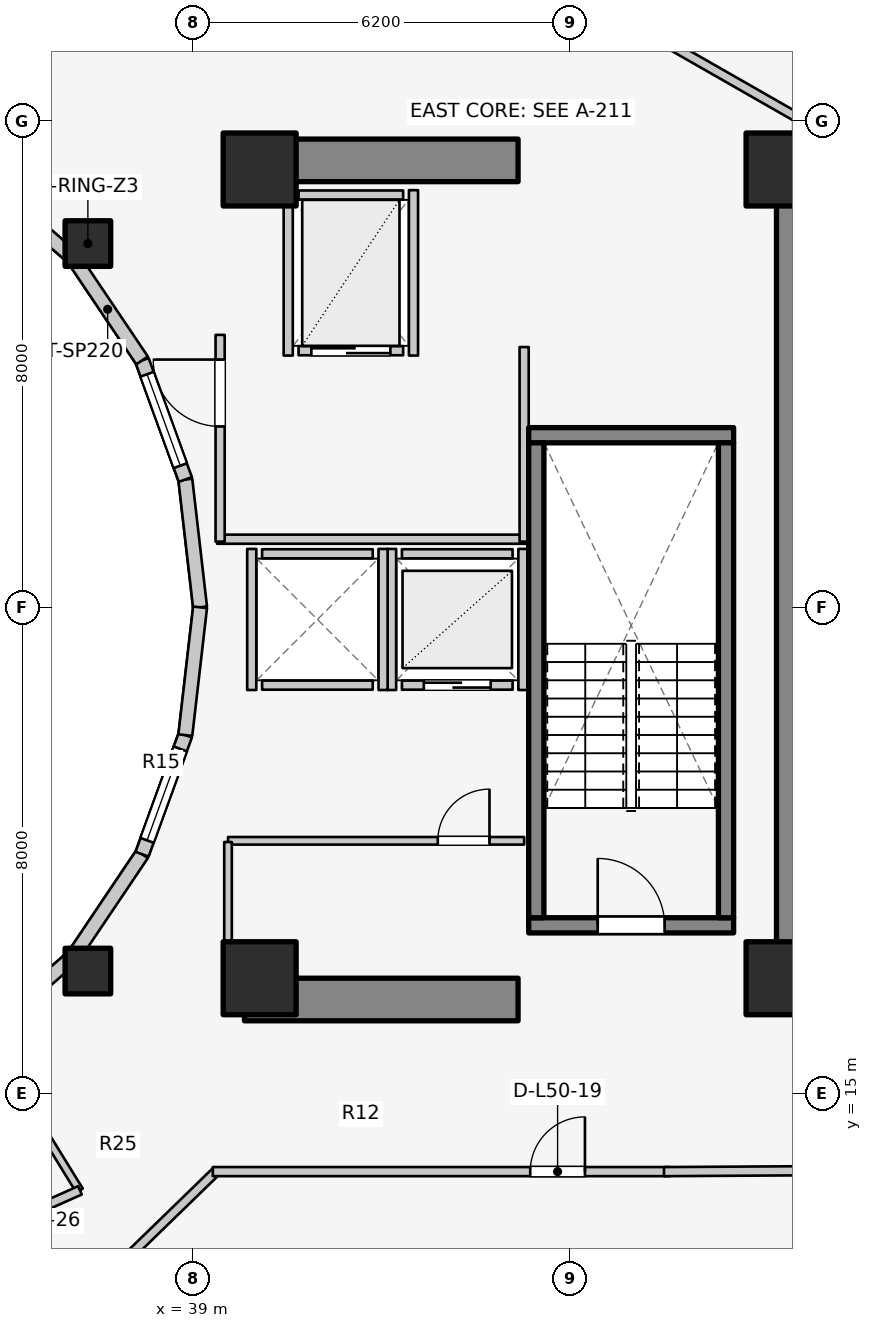
"""IFC4 building model, lengths in metres.
Left out: names, types, materials, properties, quantities, classifications, styles, units other than length and angle.
Written with IfcOpenShell. Run it as: python <this file> out.ifc"""

import sys

from ifc_helpers import new_model, si_unit, direction, frame, frame_2d, origin, origin_2d, place, context, subcontext, project, spatial, rectangle, extrude, element, fill, save


model = new_model("IFC4")
c1 = context("Model", 3, precision=1e-05, world=origin(), true_north=direction((0.0, 1.0)))
c2 = subcontext(c1, "Body", "Model", "MODEL_VIEW")
j1 = project(units=[si_unit("LENGTHUNIT", "METRE"), si_unit("PLANEANGLEUNIT", "RADIAN")], contexts=[c1])
p1 = place(None, origin())
s1 = spatial("IfcSite", under=j1, at=p1, CompositionType="ELEMENT")
p2 = place(p1, origin())
s2 = spatial("IfcBuilding", under=s1, at=p2, CompositionType="ELEMENT")
p3 = place(p2, frame((0.0, 0.0, 165.3)))
s3 = spatial("IfcBuildingStorey", under=s2, at=p3, CompositionType="ELEMENT", Elevation=165.3)
p4 = place(p3, frame((48.95, 17.05, 0.0), z_axis=(0.0, 0.0, 1.0), x_axis=(0.0, 1.0, 0.0)))
e1 = element("IfcWall", 1, at=p4, inside=s3, PredefinedType="SHEAR", context=c2, shape_type="SweptSolid", body=[
    extrude(rectangle(XDim=12.8, YDim=0.7, at=frame_2d((6.4, 0.0))), origin(), (0.0, 0.0, 1.0), 3.1),
])
for number, where, z_axis, x_axis in (
    (2, (39.85, 16.55, 0.0), (0.0, 0.0, 1.0), (1.0, 0.0, 0.0)),
    (3, (39.85, 30.35, 0.0), (0.0, 0.0, 1.0), (1.0, 0.0, 0.0)),
):
    element("IfcWall", number, at=place(p3, frame(where, z_axis=z_axis, x_axis=x_axis)), inside=s3, PredefinedType="SHEAR", context=c2, shape_type="SweptSolid", body=[
        extrude(rectangle(XDim=4.5, YDim=0.7, at=frame_2d((2.25, 0.0))), origin(), (0.0, 0.0, 1.0), 3.1),
    ])
p5 = place(p3, frame((44.525, 17.77, 0.0), z_axis=(0.0, 0.0, 1.0), x_axis=(1.0, 0.0, 0.0)))
e4 = element("IfcWall", 4, at=p5, inside=s3, PredefinedType="SOLIDWALL", context=c2, shape_type="SweptSolid", body=[
    extrude(rectangle(XDim=3.37, YDim=0.25, at=frame_2d((1.685, 0.0))), origin(), (0.0, 0.0, 1.0), 3.1),
])
p6 = place(p5, frame((1.135, 0.0, 0.0)))
e5 = element("IfcOpeningElement", 5, at=p6, cuts=e4, PredefinedType="OPENING", context=c2, shape_type="SweptSolid", body=[
    extrude(rectangle(XDim=1.1, YDim=2.1, at=frame_2d((0.55, 1.05))), frame((0.0, 0.135, 0.0), z_axis=(0.0, -1.0, 0.0), x_axis=(1.0, 0.0, 0.0)), (0.0, 0.0, 1.0), 0.27),
])
p7 = place(p3, frame((44.525, 25.83, 0.0), z_axis=(0.0, 0.0, 1.0), x_axis=(1.0, 0.0, 0.0)))
e6 = element("IfcWall", 6, at=p7, inside=s3, PredefinedType="SOLIDWALL", context=c2, shape_type="SweptSolid", body=[
    extrude(rectangle(XDim=3.37, YDim=0.25, at=frame_2d((1.685, 0.0))), origin(), (0.0, 0.0, 1.0), 3.1),
])
for number, where, z_axis, x_axis in (
    (7, (44.65, 17.895, 0.0), (0.0, 0.0, 1.0), (0.0, 1.0, 0.0)),
    (8, (47.77, 17.895, 0.0), (0.0, 0.0, 1.0), (0.0, 1.0, 0.0)),
):
    element("IfcWall", number, at=place(p3, frame(where, z_axis=z_axis, x_axis=x_axis)), inside=s3, PredefinedType="SOLIDWALL", context=c2, shape_type="SweptSolid", body=[
        extrude(rectangle(XDim=7.81, YDim=0.25, at=frame_2d((3.905, 0.0))), origin(), (0.0, 0.0, 1.0), 3.1),
    ])
for number, where, z_axis, x_axis in (
    (9, (40.1, 16.9, 0.0), (0.0, 0.0, 1.0), (1.0, 0.0, 0.0)),
    (10, (48.7, 16.9, 0.0), (0.0, 0.0, 1.0), (1.0, 0.0, 0.0)),
    (11, (48.7, 30.2, 0.0), (0.0, 0.0, 1.0), (1.0, 0.0, 0.0)),
    (12, (40.1, 30.2, 0.0), (0.0, 0.0, 1.0), (1.0, 0.0, 0.0)),
):
    element("IfcColumn", number, at=place(p3, frame(where, z_axis=z_axis, x_axis=x_axis)), inside=s3, PredefinedType="COLUMN", context=c2, shape_type="SweptSolid", body=[
        extrude(rectangle(XDim=1.2, YDim=1.2, at=origin_2d()), origin(), (0.0, 0.0, 1.0), 3.1),
    ])
for number, where, z_axis, x_axis in (
    (13, (37.275, 28.982, 0.0), (0.0, 0.0, 1.0), (1.0, 0.0, 0.0)),
    (14, (37.275, 17.018, 0.0), (0.0, 0.0, 1.0), (1.0, 0.0, 0.0)),
):
    element("IfcColumn", number, at=place(p3, frame(where, z_axis=z_axis, x_axis=x_axis)), inside=s3, PredefinedType="COLUMN", context=c2, shape_type="SweptSolid", body=[
        extrude(rectangle(XDim=0.75, YDim=0.75, at=origin_2d()), origin(), (0.0, 0.0, 1.0), 3.1),
    ])
p8 = place(p3, frame((39.12, 23.0, 0.0), z_axis=(0.0, 0.0, 1.0), x_axis=(-0.114711713601, 0.993398823617, 0.0)))
e15 = element("IfcWall", 15, at=p8, inside=s3, PredefinedType="STANDARD", context=c2, shape_type="SweptSolid", body=[
    extrude(rectangle(XDim=2.115, YDim=0.23, at=frame_2d((1.058, 0.0))), origin(), (0.0, 0.0, 1.0), 2.84),
])
p9 = place(p3, frame((38.877, 25.102, 0.0), z_axis=(0.0, 0.0, 1.0), x_axis=(-0.341423187295, 0.93990968033, 0.0)))
e16 = element("IfcWall", 16, at=p9, inside=s3, PredefinedType="STANDARD", context=c2, shape_type="SweptSolid", body=[
    extrude(rectangle(XDim=2.084, YDim=0.23, at=frame_2d((1.042, 0.0))), origin(), (0.0, 0.0, 1.0), 2.84),
])
p10 = place(p9, frame((0.242, 0.0, 0.85)))
e17 = element("IfcOpeningElement", 17, at=p10, cuts=e16, PredefinedType="OPENING", context=c2, shape_type="SweptSolid", body=[
    extrude(rectangle(XDim=1.6, YDim=1.65, at=frame_2d((0.8, 0.825))), frame((0.0, 0.125, 0.0), z_axis=(0.0, -1.0, 0.0), x_axis=(1.0, 0.0, 0.0)), (0.0, 0.0, 1.0), 0.25),
])
p11 = place(p3, frame((38.166, 27.06, 0.0), z_axis=(0.0, 0.0, 1.0), x_axis=(-0.558197800898, 0.829707909492, 0.0)))
e18 = element("IfcWall", 18, at=p11, inside=s3, PredefinedType="STANDARD", context=c2, shape_type="SweptSolid", body=[
    extrude(rectangle(XDim=2.027, YDim=0.23, at=frame_2d((1.013, 0.0))), origin(), (0.0, 0.0, 1.0), 2.16),
])
for number, where, z_axis, x_axis in (
    (19, (37.035, 28.742, 0.0), (0.0, 0.0, 1.0), (-0.753, 0.659, 0.0)),
    (20, (35.56, 15.968, 0.0), (0.0, 0.0, 1.0), (0.753, 0.659, 0.0)),
):
    element("IfcWall", number, at=place(p3, frame(where, z_axis=z_axis, x_axis=x_axis)), inside=s3, PredefinedType="STANDARD", context=c2, shape_type="SweptSolid", body=[
        extrude(rectangle(XDim=1.959, YDim=0.23, at=frame_2d((0.98, 0.0))), origin(), (0.0, 0.0, 1.0), 2.16),
    ])
p12 = place(p3, frame((37.035, 17.258, 0.0), z_axis=(0.0, 0.0, 1.0), x_axis=(0.558197800898, 0.829707909492, 0.0)))
e21 = element("IfcWall", 21, at=p12, inside=s3, PredefinedType="STANDARD", context=c2, shape_type="SweptSolid", body=[
    extrude(rectangle(XDim=2.027, YDim=0.23, at=frame_2d((1.013, 0.0))), origin(), (0.0, 0.0, 1.0), 2.16),
])
p13 = place(p3, frame((38.166, 18.94, 0.0), z_axis=(0.0, 0.0, 1.0), x_axis=(0.341423187295, 0.93990968033, 0.0)))
e22 = element("IfcWall", 22, at=p13, inside=s3, PredefinedType="STANDARD", context=c2, shape_type="SweptSolid", body=[
    extrude(rectangle(XDim=2.084, YDim=0.23, at=frame_2d((1.042, 0.0))), origin(), (0.0, 0.0, 1.0), 2.84),
])
p14 = place(p13, frame((0.242, 0.0, 0.85)))
e23 = element("IfcOpeningElement", 23, at=p14, cuts=e22, PredefinedType="OPENING", context=c2, shape_type="SweptSolid", body=[
    extrude(rectangle(XDim=1.6, YDim=1.65, at=frame_2d((0.8, 0.825))), frame((0.0, 0.125, 0.0), z_axis=(0.0, -1.0, 0.0), x_axis=(1.0, 0.0, 0.0)), (0.0, 0.0, 1.0), 0.25),
])
p15 = place(p3, frame((38.877, 20.898, 0.0), z_axis=(0.0, 0.0, 1.0), x_axis=(0.114711713601, 0.993398823617, 0.0)))
e24 = element("IfcWall", 24, at=p15, inside=s3, PredefinedType="STANDARD", context=c2, shape_type="SweptSolid", body=[
    extrude(rectangle(XDim=2.115, YDim=0.23, at=frame_2d((1.058, 0.0))), origin(), (0.0, 0.0, 1.0), 2.84),
])
p16 = place(p3, frame((48.269, 11.158, 0.0), z_axis=(0.0, 0.0, 1.0), x_axis=(0.790185650662, 0.612867552973, 0.0)))
e25 = element("IfcWall", 25, at=p16, inside=s3, PredefinedType="STANDARD", context=c2, shape_type="SweptSolid", body=[
    extrude(rectangle(XDim=4.239, YDim=0.26, at=frame_2d((2.12, 0.0))), origin(), (0.0, 0.0, 1.0), 2.85),
])
p17 = place(p16, frame((1.37, 0.0, 0.75)))
e26 = element("IfcOpeningElement", 26, at=p17, cuts=e25, PredefinedType="OPENING", context=c2, shape_type="SweptSolid", body=[
    extrude(rectangle(XDim=1.5, YDim=1.6, at=frame_2d((0.75, 0.8))), frame((0.0, 0.14, 0.0), z_axis=(0.0, -1.0, 0.0), x_axis=(1.0, 0.0, 0.0)), (0.0, 0.0, 1.0), 0.28),
])
p18 = place(p3, frame((42.44, 21.72, 0.0), z_axis=(0.0, 0.0, 1.0), x_axis=(1.0, 0.0, 0.0)))
e27 = element("IfcWall", 27, at=p18, inside=s3, PredefinedType="SOLIDWALL", context=c2, shape_type="SweptSolid", body=[
    extrude(rectangle(XDim=1.82, YDim=0.15, at=frame_2d((0.91, 0.0))), origin(), (0.0, 0.0, 1.0), 2.855),
])
p19 = place(p18, frame((0.36, 0.0, 0.0)))
e28 = element("IfcOpeningElement", 28, at=p19, cuts=e27, PredefinedType="OPENING", context=c2, shape_type="SweptSolid", body=[
    extrude(rectangle(XDim=1.1, YDim=2.1, at=frame_2d((0.55, 1.05))), frame((0.0, 0.085, 0.0), z_axis=(0.0, -1.0, 0.0), x_axis=(1.0, 0.0, 0.0)), (0.0, 0.0, 1.0), 0.17),
])
p20 = place(p3, frame((42.44, 23.88, 0.0), z_axis=(0.0, 0.0, 1.0), x_axis=(1.0, 0.0, 0.0)))
e29 = element("IfcWall", 29, at=p20, inside=s3, PredefinedType="SOLIDWALL", context=c2, shape_type="SweptSolid", body=[
    extrude(rectangle(XDim=1.82, YDim=0.15, at=frame_2d((0.91, 0.0))), origin(), (0.0, 0.0, 1.0), 2.855),
])
for number, where, z_axis, x_axis in (
    (30, (42.27, 21.64, 0.0), (0.0, 0.0, 1.0), (0.0, 1.0, 0.0)),
    (31, (44.43, 21.64, 0.0), (0.0, 0.0, 1.0), (0.0, 1.0, 0.0)),
):
    element("IfcWall", number, at=place(p3, frame(where, z_axis=z_axis, x_axis=x_axis)), inside=s3, PredefinedType="SOLIDWALL", context=c2, shape_type="SweptSolid", body=[
        extrude(rectangle(XDim=2.32, YDim=0.15, at=frame_2d((1.16, 0.0))), origin(), (0.0, 0.0, 1.0), 2.855),
    ])
for number, where, z_axis, x_axis in (
    (32, (40.14, 21.72, 0.0), (0.0, 0.0, 1.0), (1.0, 0.0, 0.0)),
    (33, (40.14, 23.88, 0.0), (0.0, 0.0, 1.0), (1.0, 0.0, 0.0)),
):
    element("IfcWall", number, at=place(p3, frame(where, z_axis=z_axis, x_axis=x_axis)), inside=s3, PredefinedType="SOLIDWALL", context=c2, shape_type="SweptSolid", body=[
        extrude(rectangle(XDim=1.82, YDim=0.15, at=frame_2d((0.91, 0.0))), origin(), (0.0, 0.0, 1.0), 2.12),
    ])
p21 = place(p3, frame((39.97, 21.64, 0.0), z_axis=(0.0, 0.0, 1.0), x_axis=(0.0, 1.0, 0.0)))
e34 = element("IfcWall", 34, at=p21, inside=s3, PredefinedType="SOLIDWALL", context=c2, shape_type="SweptSolid", body=[
    extrude(rectangle(XDim=2.32, YDim=0.15, at=frame_2d((1.16, 0.0))), origin(), (0.0, 0.0, 1.0), 2.12),
])
p22 = place(p3, frame((42.13, 21.64, 0.0), z_axis=(0.0, 0.0, 1.0), x_axis=(0.0, 1.0, 0.0)))
e35 = element("IfcWall", 35, at=p22, inside=s3, PredefinedType="SOLIDWALL", context=c2, shape_type="SweptSolid", body=[
    extrude(rectangle(XDim=2.32, YDim=0.15, at=frame_2d((1.16, 0.0))), origin(), (0.0, 0.0, 1.0), 2.855),
])
p23 = place(p3, frame((40.74, 27.22, 0.0), z_axis=(0.0, 0.0, 1.0), x_axis=(1.0, 0.0, 0.0)))
e36 = element("IfcWall", 36, at=p23, inside=s3, PredefinedType="SOLIDWALL", context=c2, shape_type="SweptSolid", body=[
    extrude(rectangle(XDim=1.72, YDim=0.15, at=frame_2d((0.86, 0.0))), origin(), (0.0, 0.0, 1.0), 2.855),
])
p24 = place(p23, frame((0.21, 0.0, 0.0)))
e37 = element("IfcOpeningElement", 37, at=p24, cuts=e36, PredefinedType="OPENING", context=c2, shape_type="SweptSolid", body=[
    extrude(rectangle(XDim=1.3, YDim=2.1, at=frame_2d((0.65, 1.05))), frame((0.0, 0.085, 0.0), z_axis=(0.0, -1.0, 0.0), x_axis=(1.0, 0.0, 0.0)), (0.0, 0.0, 1.0), 0.17),
])
p25 = place(p3, frame((40.74, 29.78, 0.0), z_axis=(0.0, 0.0, 1.0), x_axis=(1.0, 0.0, 0.0)))
e38 = element("IfcWall", 38, at=p25, inside=s3, PredefinedType="SOLIDWALL", context=c2, shape_type="SweptSolid", body=[
    extrude(rectangle(XDim=1.72, YDim=0.15, at=frame_2d((0.86, 0.0))), origin(), (0.0, 0.0, 1.0), 2.855),
])
for number, where, z_axis, x_axis in (
    (39, (40.57, 27.14, 0.0), (0.0, 0.0, 1.0), (0.0, 1.0, 0.0)),
    (40, (42.63, 27.14, 0.0), (0.0, 0.0, 1.0), (0.0, 1.0, 0.0)),
):
    element("IfcWall", number, at=place(p3, frame(where, z_axis=z_axis, x_axis=x_axis)), inside=s3, PredefinedType="SOLIDWALL", context=c2, shape_type="SweptSolid", body=[
        extrude(rectangle(XDim=2.72, YDim=0.15, at=frame_2d((1.36, 0.0))), origin(), (0.0, 0.0, 1.0), 2.855),
    ])
p26 = place(p3, frame((39.4, 24.12, 0.0), z_axis=(0.0, 0.0, 1.0), x_axis=(1.0, 0.0, 0.0)))
e41 = element("IfcWall", 41, at=p26, inside=s3, PredefinedType="PARTITIONING", context=c2, shape_type="SweptSolid", body=[
    extrude(rectangle(XDim=5.08, YDim=0.15, at=frame_2d((2.54, 0.0))), origin(), (0.0, 0.0, 1.0), 2.12),
])
p27 = place(p3, frame((44.45, 24.08, 0.0), z_axis=(0.0, 0.0, 1.0), x_axis=(0.0, 1.0, 0.0)))
e42 = element("IfcWall", 42, at=p27, inside=s3, PredefinedType="PARTITIONING", context=c2, shape_type="SweptSolid", body=[
    extrude(rectangle(XDim=3.2, YDim=0.15, at=frame_2d((1.6, 0.0))), origin(), (0.0, 0.0, 1.0), 2.855),
])
p28 = place(p3, frame((39.45, 24.08, 0.0), z_axis=(0.0, 0.0, 1.0), x_axis=(0.0, 1.0, 0.0)))
e43 = element("IfcWall", 43, at=p28, inside=s3, PredefinedType="PARTITIONING", context=c2, shape_type="SweptSolid", body=[
    extrude(rectangle(XDim=3.4, YDim=0.15, at=frame_2d((1.7, 0.0))), origin(), (0.0, 0.0, 1.0), 2.855),
])
p29 = place(p28, frame((1.894, 0.0, 0.0)))
e44 = element("IfcOpeningElement", 44, at=p29, cuts=e43, PredefinedType="OPENING", context=c2, shape_type="SweptSolid", body=[
    extrude(rectangle(XDim=1.1, YDim=2.1, at=frame_2d((0.55, 1.05))), frame((0.0, 0.085, 0.0), z_axis=(0.0, -1.0, 0.0), x_axis=(1.0, 0.0, 0.0)), (0.0, 0.0, 1.0), 0.17),
])
p30 = place(p3, frame((39.58, 19.16, 0.0), z_axis=(0.0, 0.0, 1.0), x_axis=(1.0, 0.0, 0.0)))
e45 = element("IfcWall", 45, at=p30, inside=s3, PredefinedType="PARTITIONING", context=c2, shape_type="SweptSolid", body=[
    extrude(rectangle(XDim=4.87, YDim=0.125, at=frame_2d((2.435, 0.0))), origin(), (0.0, 0.0, 1.0), 2.12),
])
p31 = place(p30, frame((3.45, 0.0, 0.0)))
e46 = element("IfcOpeningElement", 46, at=p31, cuts=e45, PredefinedType="OPENING", context=c2, shape_type="SweptSolid", body=[
    extrude(rectangle(XDim=0.85, YDim=2.05, at=frame_2d((0.425, 1.025))), frame((0.0, 0.073, 0.0), z_axis=(0.0, -1.0, 0.0), x_axis=(1.0, 0.0, 0.0)), (0.0, 0.0, 1.0), 0.145),
])
p32 = place(p3, frame((39.58, 17.1, 0.0), z_axis=(0.0, 0.0, 1.0), x_axis=(0.0, 1.0, 0.0)))
e47 = element("IfcWall", 47, at=p32, inside=s3, PredefinedType="PARTITIONING", context=c2, shape_type="SweptSolid", body=[
    extrude(rectangle(XDim=2.04, YDim=0.125, at=frame_2d((1.02, 0.0))), origin(), (0.0, 0.0, 1.0), 2.232),
])
p33 = place(p3, frame((46.757, 32.305, 0.0), z_axis=(0.0, 0.0, 1.0), x_axis=(0.867991349648, -0.496579315857, 0.0)))
e48 = element("IfcWall", 48, at=p33, inside=s3, PredefinedType="PARTITIONING", context=c2, shape_type="SweptSolid", body=[
    extrude(rectangle(XDim=2.567, YDim=0.15, at=frame_2d((1.283, 0.0))), origin(), (0.0, 0.0, 1.0), 2.22),
])
p34 = place(p3, frame((37.867, 12.251, 0.0), z_axis=(0.0, 0.0, 1.0), x_axis=(0.717419568599, 0.696641344302, 0.0)))
e49 = element("IfcWall", 49, at=p34, inside=s3, PredefinedType="PARTITIONING", context=c2, shape_type="SweptSolid", body=[
    extrude(rectangle(XDim=2.138, YDim=0.15, at=frame_2d((1.069, 0.0))), origin(), (0.0, 0.0, 1.0), 2.299),
])
p35 = place(p3, frame((39.33, 13.72, 0.0), z_axis=(0.0, 0.0, 1.0), x_axis=(1.0, 0.0, 0.0)))
e50 = element("IfcWall", 50, at=p35, inside=s3, PredefinedType="PARTITIONING", context=c2, shape_type="SweptSolid", body=[
    extrude(rectangle(XDim=7.52, YDim=0.15, at=frame_2d((3.76, 0.0))), origin(), (0.0, 0.0, 1.0), 2.299),
])
p36 = place(p35, frame((5.22, 0.0, 0.0)))
e51 = element("IfcOpeningElement", 51, at=p36, cuts=e50, PredefinedType="OPENING", context=c2, shape_type="SweptSolid", body=[
    extrude(rectangle(XDim=0.9, YDim=2.1, at=frame_2d((0.45, 1.05))), frame((0.0, 0.085, 0.0), z_axis=(0.0, -1.0, 0.0), x_axis=(1.0, 0.0, 0.0)), (0.0, 0.0, 1.0), 0.17),
])
p37 = place(p3, frame((46.75, 13.72, 0.0), z_axis=(0.0, 0.0, 1.0), x_axis=(0.999981712056, 0.006047772638, 0.0)))
e52 = element("IfcWall", 52, at=p37, inside=s3, PredefinedType="PARTITIONING", context=c2, shape_type="SweptSolid", body=[
    extrude(rectangle(XDim=4.885, YDim=0.15, at=frame_2d((2.442, 0.0))), origin(), (0.0, 0.0, 1.0), 2.22),
])
p38 = place(p3, frame((35.55, 15.985, 0.0), z_axis=(0.0, 0.0, 1.0), x_axis=(0.524565340045, -0.851370192116, 0.0)))
e53 = element("IfcWall", 53, at=p38, inside=s3, PredefinedType="PARTITIONING", context=c2, shape_type="SweptSolid", body=[
    extrude(rectangle(XDim=3.027, YDim=0.125, at=frame_2d((1.514, 0.0))), origin(), (0.0, 0.0, 1.0), 2.299),
])
p39 = place(p3, frame((34.658, 12.301, 0.0), z_axis=(0.0, 0.0, 1.0), x_axis=(0.912985265053, 0.407992531545, 0.0)))
e54 = element("IfcWall", 54, at=p39, inside=s3, PredefinedType="PARTITIONING", context=c2, shape_type="SweptSolid", body=[
    extrude(rectangle(XDim=2.723, YDim=0.15, at=frame_2d((1.362, 0.0))), origin(), (0.0, 0.0, 1.0), 2.299),
])
p40 = place(p10, origin())
e55 = element("IfcWindow", 55, at=p40, inside=s3, PartitioningType="SINGLE_PANEL", PredefinedType="WINDOW", context=c2, shape_type="SweptSolid", body=[
    extrude(rectangle(XDim=1.6, YDim=1.65, at=frame_2d((0.8, 0.825))), frame((0.0, 0.03, 0.0), z_axis=(0.0, -1.0, 0.0), x_axis=(1.0, 0.0, 0.0)), (0.0, 0.0, 1.0), 0.06),
])
fill(e17, e55)
p41 = place(p14, origin())
e56 = element("IfcWindow", 56, at=p41, inside=s3, PartitioningType="SINGLE_PANEL", PredefinedType="WINDOW", context=c2, shape_type="SweptSolid", body=[
    extrude(rectangle(XDim=1.6, YDim=1.65, at=frame_2d((0.8, 0.825))), frame((0.0, 0.03, 0.0), z_axis=(0.0, -1.0, 0.0), x_axis=(1.0, 0.0, 0.0)), (0.0, 0.0, 1.0), 0.06),
])
fill(e23, e56)
p42 = place(p6, origin())
e57 = element("IfcDoor", 57, at=p42, inside=s3, OperationType="SINGLE_SWING_LEFT", PredefinedType="DOOR", context=c2, shape_type="SweptSolid", body=[
    extrude(rectangle(XDim=1.1, YDim=2.1, at=frame_2d((0.55, 1.05))), frame((0.0, 0.025, 0.0), z_axis=(0.0, -1.0, 0.0), x_axis=(1.0, 0.0, 0.0)), (0.0, 0.0, 1.0), 0.05),
])
fill(e5, e57)
p43 = place(p19, origin())
e58 = element("IfcDoor", 58, at=p43, inside=s3, OperationType="DOUBLE_DOOR_SLIDING", PredefinedType="DOOR", context=c2, shape_type="SweptSolid", body=[
    extrude(rectangle(XDim=1.1, YDim=2.1, at=frame_2d((0.55, 1.05))), frame((0.0, 0.025, 0.0), z_axis=(0.0, -1.0, 0.0), x_axis=(1.0, 0.0, 0.0)), (0.0, 0.0, 1.0), 0.05),
])
fill(e28, e58)
p44 = place(p24, origin())
e59 = element("IfcDoor", 59, at=p44, inside=s3, OperationType="DOUBLE_DOOR_SLIDING", PredefinedType="DOOR", context=c2, shape_type="SweptSolid", body=[
    extrude(rectangle(XDim=1.3, YDim=2.1, at=frame_2d((0.65, 1.05))), frame((0.0, 0.025, 0.0), z_axis=(0.0, -1.0, 0.0), x_axis=(1.0, 0.0, 0.0)), (0.0, 0.0, 1.0), 0.05),
])
fill(e37, e59)
p45 = place(p29, origin())
e60 = element("IfcDoor", 60, at=p45, inside=s3, OperationType="SINGLE_SWING_RIGHT", PredefinedType="DOOR", context=c2, shape_type="SweptSolid", body=[
    extrude(rectangle(XDim=1.1, YDim=2.1, at=frame_2d((0.55, 1.05))), frame((0.0, 0.025, 0.0), z_axis=(0.0, -1.0, 0.0), x_axis=(1.0, 0.0, 0.0)), (0.0, 0.0, 1.0), 0.05),
])
fill(e44, e60)
p46 = place(p31, origin())
e61 = element("IfcDoor", 61, at=p46, inside=s3, OperationType="SINGLE_SWING_RIGHT", PredefinedType="DOOR", context=c2, shape_type="SweptSolid", body=[
    extrude(rectangle(XDim=0.85, YDim=2.05, at=frame_2d((0.425, 1.025))), frame((0.0, 0.025, 0.0), z_axis=(0.0, -1.0, 0.0), x_axis=(1.0, 0.0, 0.0)), (0.0, 0.0, 1.0), 0.05),
])
fill(e46, e61)
p47 = place(p36, origin())
e62 = element("IfcDoor", 62, at=p47, inside=s3, OperationType="SINGLE_SWING_RIGHT", PredefinedType="DOOR", context=c2, shape_type="SweptSolid", body=[
    extrude(rectangle(XDim=0.9, YDim=2.1, at=frame_2d((0.45, 1.05))), frame((0.0, 0.025, 0.0), z_axis=(0.0, -1.0, 0.0), x_axis=(1.0, 0.0, 0.0)), (0.0, 0.0, 1.0), 0.05),
])
fill(e51, e62)
save(model, sys.argv[1])
